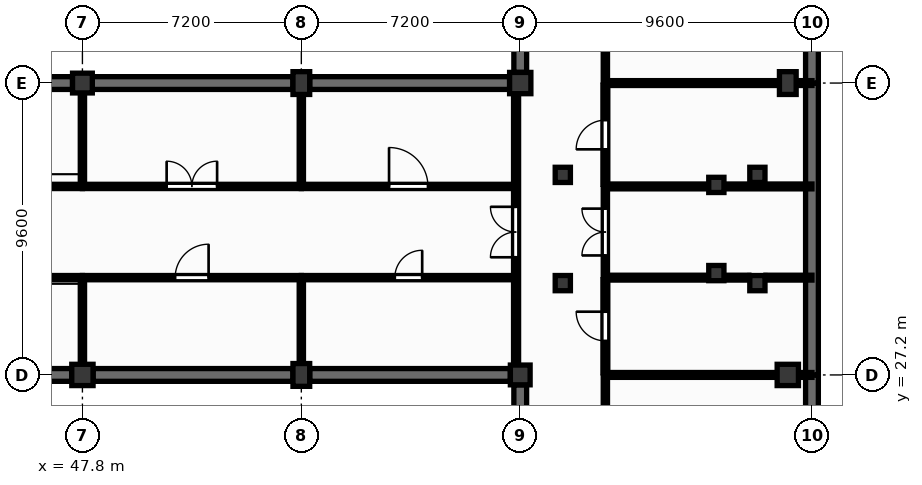
"""IFC4 building model, lengths in metres.
Left out: names, types, materials, properties, quantities, classifications, styles, units other than length and angle.
Written with IfcOpenShell. Run it as: python <this file> out.ifc"""

import sys

from ifc_helpers import new_model, si_unit, direction, frame, frame_2d, origin, origin_2d, place, context, subcontext, project, spatial, rectangle, extrude, element, fill, save


model = new_model("IFC4")
c1 = context("Model", 3, precision=1e-05, world=origin(), true_north=direction((0.0, 1.0)))
c2 = subcontext(c1, "Body", "Model", "MODEL_VIEW")
j1 = project(units=[si_unit("LENGTHUNIT", "METRE"), si_unit("PLANEANGLEUNIT", "RADIAN")], contexts=[c1])
p1 = place(None, origin())
s1 = spatial("IfcSite", under=j1, at=p1, CompositionType="ELEMENT")
p2 = place(p1, origin())
s2 = spatial("IfcBuilding", under=s1, at=p2, CompositionType="ELEMENT")
p3 = place(p2, frame((0.0, 0.0, -4.5)))
s3 = spatial("IfcBuildingStorey", under=s2, at=p3, CompositionType="ELEMENT", Elevation=-4.5)
p4 = place(p3, frame((47.8, 27.2, 0.0), z_axis=(0.0, 0.0, 1.0), x_axis=(1.0, 0.0, 0.0)))
e1 = element("IfcColumn", 1, at=p4, inside=s3, PredefinedType="COLUMN", context=c2, shape_type="SweptSolid", body=[
    extrude(rectangle(XDim=0.7, YDim=0.7, at=origin_2d()), origin(), (0.0, 0.0, 1.0), 4.2),
])
p5 = place(p3, frame((47.8, 36.8, 0.0), z_axis=(0.0, 0.0, 1.0), x_axis=(1.0, 0.0, 0.0)))
e2 = element("IfcColumn", 2, at=p5, inside=s3, PredefinedType="COLUMN", context=c2, shape_type="SweptSolid", body=[
    extrude(rectangle(XDim=0.65, YDim=0.65, at=origin_2d()), origin(), (0.0, 0.0, 1.0), 4.2),
])
for number, where, z_axis, x_axis in (
    (3, (55.0, 27.2, 0.0), (0.0, 0.0, 1.0), (1.0, 0.0, 0.0)),
    (4, (55.0, 36.8, 0.0), (0.0, 0.0, 1.0), (1.0, 0.0, 0.0)),
):
    element("IfcColumn", number, at=place(p3, frame(where, z_axis=z_axis, x_axis=x_axis)), inside=s3, PredefinedType="COLUMN", context=c2, shape_type="SweptSolid", body=[
        extrude(rectangle(XDim=0.55, YDim=0.75, at=origin_2d()), origin(), (0.0, 0.0, 1.0), 4.2),
    ])
p6 = place(p3, frame((62.2, 27.2, 0.0), z_axis=(0.0, 0.0, 1.0), x_axis=(1.0, 0.0, 0.0)))
e5 = element("IfcColumn", 5, at=p6, inside=s3, PredefinedType="COLUMN", context=c2, shape_type="SweptSolid", body=[
    extrude(rectangle(XDim=0.65, YDim=0.65, at=origin_2d()), origin(), (0.0, 0.0, 1.0), 4.2),
])
for number, where, z_axis, x_axis in (
    (6, (62.2, 36.8, 0.0), (0.0, 0.0, 1.0), (1.0, 0.0, 0.0)),
    (7, (71.0, 27.2, 0.0), (0.0, 0.0, 1.0), (1.0, 0.0, 0.0)),
):
    element("IfcColumn", number, at=place(p3, frame(where, z_axis=z_axis, x_axis=x_axis)), inside=s3, PredefinedType="COLUMN", context=c2, shape_type="SweptSolid", body=[
        extrude(rectangle(XDim=0.7, YDim=0.7, at=origin_2d()), origin(), (0.0, 0.0, 1.0), 4.2),
    ])
p7 = place(p3, frame((71.0, 36.8, 0.0), z_axis=(0.0, 0.0, 1.0), x_axis=(1.0, 0.0, 0.0)))
e8 = element("IfcColumn", 8, at=p7, inside=s3, PredefinedType="COLUMN", context=c2, shape_type="SweptSolid", body=[
    extrude(rectangle(XDim=0.55, YDim=0.75, at=origin_2d()), origin(), (0.0, 0.0, 1.0), 4.2),
])
p8 = place(p3, frame((40.875, 27.2, 0.0), z_axis=(0.0, 0.0, 1.0), x_axis=(1.0, 0.0, 0.0)))
e9 = element("IfcWall", 9, at=p8, inside=s3, PredefinedType="USERDEFINED", context=c2, shape_type="SweptSolid", body=[
    extrude(rectangle(XDim=6.575, YDim=0.42, at=frame_2d((3.288, 0.0))), origin(), (0.0, 0.0, 1.0), 4.2),
])
p9 = place(p3, frame((40.95, 36.8, 0.0), z_axis=(0.0, 0.0, 1.0), x_axis=(1.0, 0.0, 0.0)))
e10 = element("IfcWall", 10, at=p9, inside=s3, PredefinedType="USERDEFINED", context=c2, shape_type="SweptSolid", body=[
    extrude(rectangle(XDim=6.525, YDim=0.42, at=frame_2d((3.263, 0.0))), origin(), (0.0, 0.0, 1.0), 4.2),
])
p10 = place(p3, frame((48.15, 27.2, 0.0), z_axis=(0.0, 0.0, 1.0), x_axis=(1.0, 0.0, 0.0)))
e11 = element("IfcWall", 11, at=p10, inside=s3, PredefinedType="USERDEFINED", context=c2, shape_type="SweptSolid", body=[
    extrude(rectangle(XDim=6.575, YDim=0.42, at=frame_2d((3.288, 0.0))), origin(), (0.0, 0.0, 1.0), 4.2),
])
for number, where, z_axis, x_axis in (
    (12, (48.125, 36.8, 0.0), (0.0, 0.0, 1.0), (1.0, 0.0, 0.0)),
    (13, (55.275, 27.2, 0.0), (0.0, 0.0, 1.0), (1.0, 0.0, 0.0)),
):
    element("IfcWall", number, at=place(p3, frame(where, z_axis=z_axis, x_axis=x_axis)), inside=s3, PredefinedType="USERDEFINED", context=c2, shape_type="SweptSolid", body=[
        extrude(rectangle(XDim=6.6, YDim=0.42, at=frame_2d((3.3, 0.0))), origin(), (0.0, 0.0, 1.0), 4.2),
    ])
p11 = place(p3, frame((55.275, 36.8, 0.0), z_axis=(0.0, 0.0, 1.0), x_axis=(1.0, 0.0, 0.0)))
e14 = element("IfcWall", 14, at=p11, inside=s3, PredefinedType="USERDEFINED", context=c2, shape_type="SweptSolid", body=[
    extrude(rectangle(XDim=6.575, YDim=0.42, at=frame_2d((3.288, 0.0))), origin(), (0.0, 0.0, 1.0), 4.2),
])
p12 = place(p3, frame((62.2, 18.925, 0.0), z_axis=(0.0, 0.0, 1.0), x_axis=(0.0, 1.0, 0.0)))
e15 = element("IfcWall", 15, at=p12, inside=s3, PredefinedType="USERDEFINED", context=c2, shape_type="SweptSolid", body=[
    extrude(rectangle(XDim=7.95, YDim=0.42, at=frame_2d((3.975, 0.0))), origin(), (0.0, 0.0, 1.0), 4.2),
])
p13 = place(p3, frame((71.795, 18.6, 0.0), z_axis=(0.0, 0.0, 1.0), x_axis=(0.0, 1.0, 0.0)))
e16 = element("IfcWall", 16, at=p13, inside=s3, PredefinedType="USERDEFINED", context=c2, shape_type="SweptSolid", body=[
    extrude(rectangle(XDim=8.6, YDim=0.42, at=frame_2d((4.3, 0.0))), origin(), (0.0, 0.0, 1.0), 4.2),
])
p14 = place(p3, frame((71.795, 27.2, 0.0), z_axis=(0.0, 0.0, 1.0), x_axis=(0.0, 1.0, 0.0)))
e17 = element("IfcWall", 17, at=p14, inside=s3, PredefinedType="USERDEFINED", context=c2, shape_type="SweptSolid", body=[
    extrude(rectangle(XDim=9.6, YDim=0.42, at=frame_2d((4.8, 0.0))), origin(), (0.0, 0.0, 1.0), 4.2),
])
p15 = place(p3, frame((62.2, 37.15, 0.0), z_axis=(0.0, 0.0, 1.0), x_axis=(0.0, 1.0, 0.0)))
e18 = element("IfcWall", 18, at=p15, inside=s3, PredefinedType="USERDEFINED", context=c2, shape_type="SweptSolid", body=[
    extrude(rectangle(XDim=7.925, YDim=0.42, at=frame_2d((3.962, 0.0))), origin(), (0.0, 0.0, 1.0), 4.2),
])
p16 = place(p3, frame((71.795, 36.8, 0.0), z_axis=(0.0, 0.0, 1.0), x_axis=(0.0, 1.0, 0.0)))
e19 = element("IfcWall", 19, at=p16, inside=s3, PredefinedType="USERDEFINED", context=c2, shape_type="SweptSolid", body=[
    extrude(rectangle(XDim=8.6, YDim=0.42, at=frame_2d((4.3, 0.0))), origin(), (0.0, 0.0, 1.0), 4.2),
])
for number, where, z_axis, x_axis in (
    (20, (63.6, 30.22, 0.0), (0.0, 0.0, 1.0), (1.0, 0.0, 0.0)),
    (21, (70.0, 30.22, 0.0), (0.0, 0.0, 1.0), (1.0, 0.0, 0.0)),
    (22, (70.0, 33.78, 0.0), (0.0, 0.0, 1.0), (1.0, 0.0, 0.0)),
    (23, (63.6, 33.78, 0.0), (0.0, 0.0, 1.0), (1.0, 0.0, 0.0)),
    (24, (68.65, 30.55, 0.0), (0.0, 0.0, 1.0), (1.0, 0.0, 0.0)),
    (25, (68.65, 33.45, 0.0), (0.0, 0.0, 1.0), (1.0, 0.0, 0.0)),
):
    element("IfcColumn", number, at=place(p3, frame(where, z_axis=z_axis, x_axis=x_axis)), inside=s3, PredefinedType="COLUMN", context=c2, shape_type="SweptSolid", body=[
        extrude(rectangle(XDim=0.5, YDim=0.5, at=origin_2d()), origin(), (0.0, 0.0, 1.0), 4.2),
    ])
p17 = place(p3, frame((40.6, 30.4, 0.0), z_axis=(0.0, 0.0, 1.0), x_axis=(1.0, 0.0, 0.0)))
e26 = element("IfcWall", 26, at=p17, inside=s3, PredefinedType="PARTITIONING", context=c2, shape_type="SweptSolid", body=[
    extrude(rectangle(XDim=7.2, YDim=0.14, at=frame_2d((3.6, 0.0))), origin(), (0.0, 0.0, 1.0), 4.08),
])
p18 = place(p17, frame((2.96, 0.0, 0.0)))
e27 = element("IfcOpeningElement", 27, at=p18, cuts=e26, PredefinedType="OPENING", context=c2, shape_type="SweptSolid", body=[
    extrude(rectangle(XDim=1.28, YDim=2.2, at=frame_2d((0.64, 1.1))), frame((0.0, 0.08, 0.0), z_axis=(0.0, -1.0, 0.0), x_axis=(1.0, 0.0, 0.0)), (0.0, 0.0, 1.0), 0.16),
])
p19 = place(p3, frame((40.6, 33.4, 0.0), z_axis=(0.0, 0.0, 1.0), x_axis=(1.0, 0.0, 0.0)))
e28 = element("IfcWall", 28, at=p19, inside=s3, PredefinedType="PARTITIONING", context=c2, shape_type="SweptSolid", body=[
    extrude(rectangle(XDim=7.2, YDim=0.14, at=frame_2d((3.6, 0.0))), origin(), (0.0, 0.0, 1.0), 4.08),
])
p20 = place(p19, frame((3.15, 0.0, 0.0)))
e29 = element("IfcOpeningElement", 29, at=p20, cuts=e28, PredefinedType="OPENING", context=c2, shape_type="SweptSolid", body=[
    extrude(rectangle(XDim=0.9, YDim=2.1, at=frame_2d((0.45, 1.05))), frame((0.0, 0.08, 0.0), z_axis=(0.0, -1.0, 0.0), x_axis=(1.0, 0.0, 0.0)), (0.0, 0.0, 1.0), 0.16),
])
p21 = place(p3, frame((47.8, 27.55, 0.0), z_axis=(0.0, 0.0, 1.0), x_axis=(0.0, 1.0, 0.0)))
e30 = element("IfcWall", 30, at=p21, inside=s3, PredefinedType="PARTITIONING", context=c2, shape_type="SweptSolid", body=[
    extrude(rectangle(XDim=2.78, YDim=0.14, at=frame_2d((1.39, 0.0))), origin(), (0.0, 0.0, 1.0), 3.4),
])
p22 = place(p3, frame((47.8, 30.4, 0.0), z_axis=(0.0, 0.0, 1.0), x_axis=(1.0, 0.0, 0.0)))
e31 = element("IfcWall", 31, at=p22, inside=s3, PredefinedType="PARTITIONING", context=c2, shape_type="SweptSolid", body=[
    extrude(rectangle(XDim=7.2, YDim=0.14, at=frame_2d((3.6, 0.0))), origin(), (0.0, 0.0, 1.0), 4.08),
])
p23 = place(p22, frame((3.05, 0.0, 0.0)))
e32 = element("IfcOpeningElement", 32, at=p23, cuts=e31, PredefinedType="OPENING", context=c2, shape_type="SweptSolid", body=[
    extrude(rectangle(XDim=1.1, YDim=2.1, at=frame_2d((0.55, 1.05))), frame((0.0, 0.08, 0.0), z_axis=(0.0, -1.0, 0.0), x_axis=(1.0, 0.0, 0.0)), (0.0, 0.0, 1.0), 0.16),
])
p24 = place(p3, frame((47.8, 33.47, 0.0), z_axis=(0.0, 0.0, 1.0), x_axis=(0.0, 1.0, 0.0)))
e33 = element("IfcWall", 33, at=p24, inside=s3, PredefinedType="PARTITIONING", context=c2, shape_type="SweptSolid", body=[
    extrude(rectangle(XDim=3.005, YDim=0.14, at=frame_2d((1.502, 0.0))), origin(), (0.0, 0.0, 1.0), 3.4),
])
p25 = place(p3, frame((47.8, 33.4, 0.0), z_axis=(0.0, 0.0, 1.0), x_axis=(1.0, 0.0, 0.0)))
e34 = element("IfcWall", 34, at=p25, inside=s3, PredefinedType="PARTITIONING", context=c2, shape_type="SweptSolid", body=[
    extrude(rectangle(XDim=7.2, YDim=0.14, at=frame_2d((3.6, 0.0))), origin(), (0.0, 0.0, 1.0), 4.08),
])
p26 = place(p25, frame((2.77, 0.0, 0.0)))
e35 = element("IfcOpeningElement", 35, at=p26, cuts=e34, PredefinedType="OPENING", context=c2, shape_type="SweptSolid", body=[
    extrude(rectangle(XDim=1.66, YDim=2.3, at=frame_2d((0.83, 1.15))), frame((0.0, 0.08, 0.0), z_axis=(0.0, -1.0, 0.0), x_axis=(1.0, 0.0, 0.0)), (0.0, 0.0, 1.0), 0.16),
])
p27 = place(p3, frame((55.0, 27.575, 0.0), z_axis=(0.0, 0.0, 1.0), x_axis=(0.0, 1.0, 0.0)))
e36 = element("IfcWall", 36, at=p27, inside=s3, PredefinedType="PARTITIONING", context=c2, shape_type="SweptSolid", body=[
    extrude(rectangle(XDim=2.755, YDim=0.14, at=frame_2d((1.377, 0.0))), origin(), (0.0, 0.0, 1.0), 3.4),
])
p28 = place(p3, frame((55.0, 30.4, 0.0), z_axis=(0.0, 0.0, 1.0), x_axis=(1.0, 0.0, 0.0)))
e37 = element("IfcWall", 37, at=p28, inside=s3, PredefinedType="PARTITIONING", context=c2, shape_type="SweptSolid", body=[
    extrude(rectangle(XDim=7.05, YDim=0.14, at=frame_2d((3.525, 0.0))), origin(), (0.0, 0.0, 1.0), 4.08),
])
p29 = place(p28, frame((3.075, 0.0, 0.0)))
e38 = element("IfcOpeningElement", 38, at=p29, cuts=e37, PredefinedType="OPENING", context=c2, shape_type="SweptSolid", body=[
    extrude(rectangle(XDim=0.9, YDim=2.1, at=frame_2d((0.45, 1.05))), frame((0.0, 0.08, 0.0), z_axis=(0.0, -1.0, 0.0), x_axis=(1.0, 0.0, 0.0)), (0.0, 0.0, 1.0), 0.16),
])
p30 = place(p3, frame((55.0, 33.47, 0.0), z_axis=(0.0, 0.0, 1.0), x_axis=(0.0, 1.0, 0.0)))
e39 = element("IfcWall", 39, at=p30, inside=s3, PredefinedType="PARTITIONING", context=c2, shape_type="SweptSolid", body=[
    extrude(rectangle(XDim=2.955, YDim=0.14, at=frame_2d((1.478, 0.0))), origin(), (0.0, 0.0, 1.0), 3.4),
])
p31 = place(p3, frame((55.0, 33.4, 0.0), z_axis=(0.0, 0.0, 1.0), x_axis=(1.0, 0.0, 0.0)))
e40 = element("IfcWall", 40, at=p31, inside=s3, PredefinedType="PARTITIONING", context=c2, shape_type="SweptSolid", body=[
    extrude(rectangle(XDim=7.05, YDim=0.14, at=frame_2d((3.525, 0.0))), origin(), (0.0, 0.0, 1.0), 4.08),
])
p32 = place(p31, frame((2.885, 0.0, 0.0)))
e41 = element("IfcOpeningElement", 41, at=p32, cuts=e40, PredefinedType="OPENING", context=c2, shape_type="SweptSolid", body=[
    extrude(rectangle(XDim=1.28, YDim=2.2, at=frame_2d((0.64, 1.1))), frame((0.0, 0.08, 0.0), z_axis=(0.0, -1.0, 0.0), x_axis=(1.0, 0.0, 0.0)), (0.0, 0.0, 1.0), 0.16),
])
p33 = place(p3, frame((62.05, 27.525, 0.0), z_axis=(0.0, 0.0, 1.0), x_axis=(0.0, 1.0, 0.0)))
e42 = element("IfcWall", 42, at=p33, inside=s3, PredefinedType="PARTITIONING", context=c2, shape_type="SweptSolid", body=[
    extrude(rectangle(XDim=2.805, YDim=0.14, at=frame_2d((1.403, 0.0))), origin(), (0.0, 0.0, 1.0), 3.4),
])
p34 = place(p3, frame((62.05, 30.47, 0.0), z_axis=(0.0, 0.0, 1.0), x_axis=(0.0, 1.0, 0.0)))
e43 = element("IfcWall", 43, at=p34, inside=s3, PredefinedType="PARTITIONING", context=c2, shape_type="SweptSolid", body=[
    extrude(rectangle(XDim=2.86, YDim=0.14, at=frame_2d((1.43, 0.0))), origin(), (0.0, 0.0, 1.0), 3.4),
])
p35 = place(p34, frame((0.6, 0.0, 0.0)))
e44 = element("IfcOpeningElement", 44, at=p35, cuts=e43, PredefinedType="OPENING", context=c2, shape_type="SweptSolid", body=[
    extrude(rectangle(XDim=1.66, YDim=2.3, at=frame_2d((0.83, 1.15))), frame((0.0, 0.08, 0.0), z_axis=(0.0, -1.0, 0.0), x_axis=(1.0, 0.0, 0.0)), (0.0, 0.0, 1.0), 0.16),
])
p36 = place(p3, frame((62.05, 33.47, 0.0), z_axis=(0.0, 0.0, 1.0), x_axis=(0.0, 1.0, 0.0)))
e45 = element("IfcWall", 45, at=p36, inside=s3, PredefinedType="PARTITIONING", context=c2, shape_type="SweptSolid", body=[
    extrude(rectangle(XDim=2.98, YDim=0.14, at=frame_2d((1.49, 0.0))), origin(), (0.0, 0.0, 1.0), 3.4),
])
p37 = place(p3, frame((65.0, 18.67, 0.0), z_axis=(0.0, 0.0, 1.0), x_axis=(0.0, 1.0, 0.0)))
e46 = element("IfcWall", 46, at=p37, inside=s3, PredefinedType="PARTITIONING", context=c2, shape_type="SweptSolid", body=[
    extrude(rectangle(XDim=8.46, YDim=0.14, at=frame_2d((4.23, 0.0))), origin(), (0.0, 0.0, 1.0), 4.08),
])
p38 = place(p37, frame((3.78, 0.0, 0.0)))
e47 = element("IfcOpeningElement", 47, at=p38, cuts=e46, PredefinedType="OPENING", context=c2, shape_type="SweptSolid", body=[
    extrude(rectangle(XDim=0.9, YDim=2.1, at=frame_2d((0.45, 1.05))), frame((0.0, 0.08, 0.0), z_axis=(0.0, -1.0, 0.0), x_axis=(1.0, 0.0, 0.0)), (0.0, 0.0, 1.0), 0.16),
])
p39 = place(p3, frame((65.0, 27.27, 0.0), z_axis=(0.0, 0.0, 1.0), x_axis=(0.0, 1.0, 0.0)))
e48 = element("IfcWall", 48, at=p39, inside=s3, PredefinedType="PARTITIONING", context=c2, shape_type="SweptSolid", body=[
    extrude(rectangle(XDim=3.06, YDim=0.16, at=frame_2d((1.53, 0.0))), origin(), (0.0, 0.0, 1.0), 4.08),
])
p40 = place(p39, frame((1.05, 0.0, 0.0)))
e49 = element("IfcOpeningElement", 49, at=p40, cuts=e48, PredefinedType="OPENING", context=c2, shape_type="SweptSolid", body=[
    extrude(rectangle(XDim=0.96, YDim=2.1, at=frame_2d((0.48, 1.05))), frame((0.0, 0.09, 0.0), z_axis=(0.0, -1.0, 0.0), x_axis=(1.0, 0.0, 0.0)), (0.0, 0.0, 1.0), 0.18),
])
p41 = place(p3, frame((65.0, 27.2, 0.0), z_axis=(0.0, 0.0, 1.0), x_axis=(1.0, 0.0, 0.0)))
e50 = element("IfcWall", 50, at=p41, inside=s3, PredefinedType="PARTITIONING", context=c2, shape_type="SweptSolid", body=[
    extrude(rectangle(XDim=5.65, YDim=0.16, at=frame_2d((2.825, 0.0))), origin(), (0.0, 0.0, 1.0), 3.4),
])
p42 = place(p3, frame((71.35, 27.2, 0.0), z_axis=(0.0, 0.0, 1.0), x_axis=(1.0, 0.0, 0.0)))
e51 = element("IfcWall", 51, at=p42, inside=s3, PredefinedType="PARTITIONING", context=c2, shape_type="SweptSolid", body=[
    extrude(rectangle(XDim=0.445, YDim=0.16, at=frame_2d((0.222, 0.0))), origin(), (0.0, 0.0, 1.0), 4.08),
])
p43 = place(p3, frame((65.0, 30.47, 0.0), z_axis=(0.0, 0.0, 1.0), x_axis=(0.0, 1.0, 0.0)))
e52 = element("IfcWall", 52, at=p43, inside=s3, PredefinedType="PARTITIONING", context=c2, shape_type="SweptSolid", body=[
    extrude(rectangle(XDim=2.86, YDim=0.14, at=frame_2d((1.43, 0.0))), origin(), (0.0, 0.0, 1.0), 4.08),
])
p44 = place(p43, frame((0.66, 0.0, 0.0)))
e53 = element("IfcOpeningElement", 53, at=p44, cuts=e52, PredefinedType="OPENING", context=c2, shape_type="SweptSolid", body=[
    extrude(rectangle(XDim=1.54, YDim=2.25, at=frame_2d((0.77, 1.125))), frame((0.0, 0.08, 0.0), z_axis=(0.0, -1.0, 0.0), x_axis=(1.0, 0.0, 0.0)), (0.0, 0.0, 1.0), 0.16),
])
p45 = place(p3, frame((65.0, 30.4, 0.0), z_axis=(0.0, 0.0, 1.0), x_axis=(1.0, 0.0, 0.0)))
e54 = element("IfcWall", 54, at=p45, inside=s3, PredefinedType="PARTITIONING", context=c2, shape_type="SweptSolid", body=[
    extrude(rectangle(XDim=3.37, YDim=0.16, at=frame_2d((1.685, 0.0))), origin(), (0.0, 0.0, 1.0), 4.08),
])
p46 = place(p3, frame((68.93, 30.4, 0.0), z_axis=(0.0, 0.0, 1.0), x_axis=(1.0, 0.0, 0.0)))
e55 = element("IfcWall", 55, at=p46, inside=s3, PredefinedType="PARTITIONING", context=c2, shape_type="SweptSolid", body=[
    extrude(rectangle(XDim=0.79, YDim=0.16, at=frame_2d((0.395, 0.0))), origin(), (0.0, 0.0, 1.0), 4.08),
])
p47 = place(p3, frame((70.28, 30.4, 0.0), z_axis=(0.0, 0.0, 1.0), x_axis=(1.0, 0.0, 0.0)))
e56 = element("IfcWall", 56, at=p47, inside=s3, PredefinedType="PARTITIONING", context=c2, shape_type="SweptSolid", body=[
    extrude(rectangle(XDim=1.515, YDim=0.16, at=frame_2d((0.757, 0.0))), origin(), (0.0, 0.0, 1.0), 4.08),
])
p48 = place(p3, frame((65.0, 33.47, 0.0), z_axis=(0.0, 0.0, 1.0), x_axis=(0.0, 1.0, 0.0)))
e57 = element("IfcWall", 57, at=p48, inside=s3, PredefinedType="PARTITIONING", context=c2, shape_type="SweptSolid", body=[
    extrude(rectangle(XDim=3.26, YDim=0.16, at=frame_2d((1.63, 0.0))), origin(), (0.0, 0.0, 1.0), 4.08),
])
p49 = place(p48, frame((1.15, 0.0, 0.0)))
e58 = element("IfcOpeningElement", 58, at=p49, cuts=e57, PredefinedType="OPENING", context=c2, shape_type="SweptSolid", body=[
    extrude(rectangle(XDim=0.96, YDim=2.1, at=frame_2d((0.48, 1.05))), frame((0.0, 0.09, 0.0), z_axis=(0.0, -1.0, 0.0), x_axis=(1.0, 0.0, 0.0)), (0.0, 0.0, 1.0), 0.18),
])
p50 = place(p3, frame((65.0, 33.4, 0.0), z_axis=(0.0, 0.0, 1.0), x_axis=(1.0, 0.0, 0.0)))
e59 = element("IfcWall", 59, at=p50, inside=s3, PredefinedType="PARTITIONING", context=c2, shape_type="SweptSolid", body=[
    extrude(rectangle(XDim=3.37, YDim=0.16, at=frame_2d((1.685, 0.0))), origin(), (0.0, 0.0, 1.0), 4.08),
])
p51 = place(p3, frame((68.93, 33.4, 0.0), z_axis=(0.0, 0.0, 1.0), x_axis=(1.0, 0.0, 0.0)))
e60 = element("IfcWall", 60, at=p51, inside=s3, PredefinedType="PARTITIONING", context=c2, shape_type="SweptSolid", body=[
    extrude(rectangle(XDim=2.865, YDim=0.16, at=frame_2d((1.433, 0.0))), origin(), (0.0, 0.0, 1.0), 4.08),
])
p52 = place(p3, frame((65.0, 36.87, 0.0), z_axis=(0.0, 0.0, 1.0), x_axis=(0.0, 1.0, 0.0)))
e61 = element("IfcWall", 61, at=p52, inside=s3, PredefinedType="PARTITIONING", context=c2, shape_type="SweptSolid", body=[
    extrude(rectangle(XDim=8.46, YDim=0.14, at=frame_2d((4.23, 0.0))), origin(), (0.0, 0.0, 1.0), 4.08),
])
p53 = place(p52, frame((3.68, 0.0, 0.0)))
e62 = element("IfcOpeningElement", 62, at=p53, cuts=e61, PredefinedType="OPENING", context=c2, shape_type="SweptSolid", body=[
    extrude(rectangle(XDim=1.1, YDim=2.1, at=frame_2d((0.55, 1.05))), frame((0.0, 0.08, 0.0), z_axis=(0.0, -1.0, 0.0), x_axis=(1.0, 0.0, 0.0)), (0.0, 0.0, 1.0), 0.16),
])
p54 = place(p3, frame((65.0, 36.8, 0.0), z_axis=(0.0, 0.0, 1.0), x_axis=(1.0, 0.0, 0.0)))
e63 = element("IfcWall", 63, at=p54, inside=s3, PredefinedType="PARTITIONING", context=c2, shape_type="SweptSolid", body=[
    extrude(rectangle(XDim=5.725, YDim=0.16, at=frame_2d((2.863, 0.0))), origin(), (0.0, 0.0, 1.0), 3.4),
])
p55 = place(p3, frame((71.275, 36.8, 0.0), z_axis=(0.0, 0.0, 1.0), x_axis=(1.0, 0.0, 0.0)))
e64 = element("IfcWall", 64, at=p55, inside=s3, PredefinedType="PARTITIONING", context=c2, shape_type="SweptSolid", body=[
    extrude(rectangle(XDim=0.52, YDim=0.16, at=frame_2d((0.26, 0.0))), origin(), (0.0, 0.0, 1.0), 4.08),
])
p56 = place(p35, origin())
e65 = element("IfcDoor", 65, at=p56, inside=s3, OperationType="DOUBLE_DOOR_SINGLE_SWING", PredefinedType="DOOR", context=c2, shape_type="SweptSolid", body=[
    extrude(rectangle(XDim=1.66, YDim=2.3, at=frame_2d((0.83, 1.15))), frame((0.0, 0.025, 0.0), z_axis=(0.0, -1.0, 0.0), x_axis=(1.0, 0.0, 0.0)), (0.0, 0.0, 1.0), 0.05),
])
fill(e44, e65)
p57 = place(p44, origin())
e66 = element("IfcDoor", 66, at=p57, inside=s3, OperationType="DOUBLE_DOOR_SINGLE_SWING", PredefinedType="DOOR", context=c2, shape_type="SweptSolid", body=[
    extrude(rectangle(XDim=1.54, YDim=2.25, at=frame_2d((0.77, 1.125))), frame((0.0, 0.025, 0.0), z_axis=(0.0, -1.0, 0.0), x_axis=(1.0, 0.0, 0.0)), (0.0, 0.0, 1.0), 0.05),
])
fill(e53, e66)
p58 = place(p23, origin())
e67 = element("IfcDoor", 67, at=p58, inside=s3, OperationType="SINGLE_SWING_RIGHT", PredefinedType="DOOR", context=c2, shape_type="SweptSolid", body=[
    extrude(rectangle(XDim=1.1, YDim=2.1, at=frame_2d((0.55, 1.05))), frame((0.0, 0.025, 0.0), z_axis=(0.0, -1.0, 0.0), x_axis=(1.0, 0.0, 0.0)), (0.0, 0.0, 1.0), 0.05),
])
fill(e32, e67)
p59 = place(p26, origin())
e68 = element("IfcDoor", 68, at=p59, inside=s3, OperationType="DOUBLE_DOOR_SINGLE_SWING", PredefinedType="DOOR", context=c2, shape_type="SweptSolid", body=[
    extrude(rectangle(XDim=1.66, YDim=2.3, at=frame_2d((0.83, 1.15))), frame((0.0, 0.025, 0.0), z_axis=(0.0, -1.0, 0.0), x_axis=(1.0, 0.0, 0.0)), (0.0, 0.0, 1.0), 0.05),
])
fill(e35, e68)
p60 = place(p29, origin())
e69 = element("IfcDoor", 69, at=p60, inside=s3, OperationType="SINGLE_SWING_RIGHT", PredefinedType="DOOR", context=c2, shape_type="SweptSolid", body=[
    extrude(rectangle(XDim=0.9, YDim=2.1, at=frame_2d((0.45, 1.05))), frame((0.0, 0.025, 0.0), z_axis=(0.0, -1.0, 0.0), x_axis=(1.0, 0.0, 0.0)), (0.0, 0.0, 1.0), 0.05),
])
fill(e38, e69)
p61 = place(p32, origin())
e70 = element("IfcDoor", 70, at=p61, inside=s3, OperationType="SINGLE_SWING_LEFT", PredefinedType="DOOR", context=c2, shape_type="SweptSolid", body=[
    extrude(rectangle(XDim=1.28, YDim=2.2, at=frame_2d((0.64, 1.1))), frame((0.0, 0.025, 0.0), z_axis=(0.0, -1.0, 0.0), x_axis=(1.0, 0.0, 0.0)), (0.0, 0.0, 1.0), 0.05),
])
fill(e41, e70)
p62 = place(p40, origin())
e71 = element("IfcDoor", 71, at=p62, inside=s3, OperationType="SINGLE_SWING_RIGHT", PredefinedType="DOOR", context=c2, shape_type="SweptSolid", body=[
    extrude(rectangle(XDim=0.96, YDim=2.1, at=frame_2d((0.48, 1.05))), frame((0.0, 0.025, 0.0), z_axis=(0.0, -1.0, 0.0), x_axis=(1.0, 0.0, 0.0)), (0.0, 0.0, 1.0), 0.05),
])
fill(e49, e71)
p63 = place(p49, origin())
e72 = element("IfcDoor", 72, at=p63, inside=s3, OperationType="SINGLE_SWING_LEFT", PredefinedType="DOOR", context=c2, shape_type="SweptSolid", body=[
    extrude(rectangle(XDim=0.96, YDim=2.1, at=frame_2d((0.48, 1.05))), frame((0.0, 0.025, 0.0), z_axis=(0.0, -1.0, 0.0), x_axis=(1.0, 0.0, 0.0)), (0.0, 0.0, 1.0), 0.05),
])
fill(e58, e72)
save(model, sys.argv[1])
